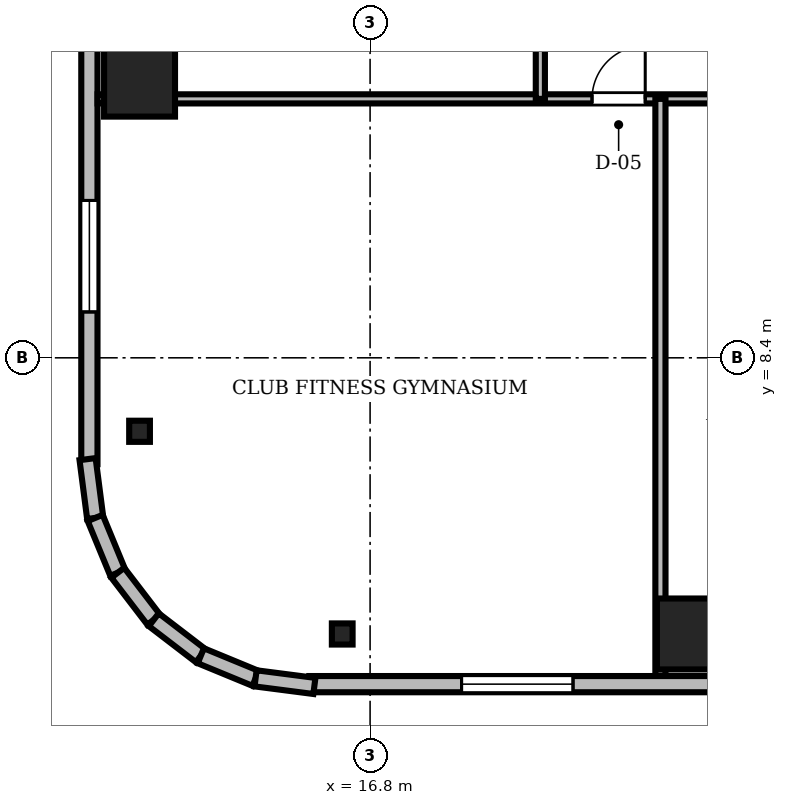
"""IFC4 building model, lengths in metres.
Left out: names, types, materials, properties, quantities, classifications, styles, units other than length and angle.
Written with IfcOpenShell. Run it as: python <this file> out.ifc"""

import sys

from ifc_helpers import new_model, si_unit, direction, frame, frame_2d, origin, origin_2d, place, context, subcontext, project, spatial, rectangle, i_section, extrude, source, transform, mapped, element, fill, save


model = new_model("IFC4")
c1 = context("Model", 3, precision=1e-05, world=origin(), true_north=direction((0.0, 1.0)))
c2 = subcontext(c1, "Body", "Model", "MODEL_VIEW")
j1 = project(units=[si_unit("LENGTHUNIT", "METRE"), si_unit("PLANEANGLEUNIT", "RADIAN")], contexts=[c1])
p1 = place(None, origin())
s1 = spatial("IfcSite", under=j1, at=p1, CompositionType="ELEMENT")
p2 = place(p1, origin())
s2 = spatial("IfcBuilding", under=s1, at=p2, CompositionType="ELEMENT")
p3 = place(p2, frame((0.0, 0.0, 184.8)))
s3 = spatial("IfcBuildingStorey", under=s2, at=p3, CompositionType="ELEMENT", Elevation=184.8)
m1 = source(origin(), c2, "Body", "SweptSolid", [
    extrude(rectangle(XDim=1.4, YDim=1.4, at=origin_2d()), origin(), (0.0, 0.0, 1.0), 3.53),
])
for number, where, z_axis, x_axis in (
    (1, (23.16, 2.95, 0.0), (0.0, 0.0, 1.0), (1.0, 0.0, 0.0)),
    (2, (12.25, 13.86, 0.0), (0.0, 0.0, 1.0), (1.0, 0.0, 0.0)),
):
    element("IfcColumn", number, at=place(p3, frame(where, z_axis=z_axis, x_axis=x_axis)), inside=s3, PredefinedType="COLUMN", context=c2, shape_type="MappedRepresentation", body=[
        mapped(m1, transform((0.0, 0.0, 0.0), scale=1.0)),
    ])
m2 = source(origin(), c2, "Body", "SweptSolid", [
    extrude(i_section(OverallWidth=0.409, OverallDepth=0.417, WebThickness=0.021, FlangeThickness=0.033, FilletRadius=0.015, at=origin_2d()), origin(), (0.0, 0.0, 1.0), 3.53),
])
for number, where, z_axis, x_axis in (
    (3, (16.25, 2.95, 0.0), (0.0, 0.0, 1.0), (1.0, 0.0, 0.0)),
    (4, (12.25, 6.95, 0.0), (0.0, 0.0, 1.0), (1.0, 0.0, 0.0)),
):
    element("IfcColumn", number, at=place(p3, frame(where, z_axis=z_axis, x_axis=x_axis)), inside=s3, PredefinedType="COLUMN", context=c2, shape_type="MappedRepresentation", body=[
        mapped(m2, transform((0.0, 0.0, 0.0), scale=1.0)),
    ])
m3 = source(origin(), c2, "Body", "SweptSolid", [
    extrude(rectangle(XDim=15.6, YDim=0.32, at=frame_2d((7.8, 0.0))), origin(), (0.0, 0.0, 1.0), 3.53),
])
p4 = place(p3, frame((15.6, 1.96, 0.0), z_axis=(0.0, 0.0, 1.0), x_axis=(1.0, 0.0, 0.0)))
e5 = element("IfcWall", 5, at=p4, inside=s3, PredefinedType="SOLIDWALL", context=c2, shape_type="MappedRepresentation", body=[
    mapped(m3, transform((0.0, 0.0, 0.0), scale=1.0)),
])
m4 = source(origin(), c2, "Body", "SweptSolid", [
    extrude(rectangle(XDim=1.4, YDim=2.3, at=frame_2d((0.7, 1.15))), frame((0.0, 0.17, 0.0), z_axis=(0.0, -1.0, 0.0), x_axis=(1.0, 0.0, 0.0)), (0.0, 0.0, 1.0), 0.34),
])
p5 = place(p4, frame((9.61, 0.0, 0.0)))
e6 = element("IfcOpeningElement", 6, at=p5, cuts=e5, PredefinedType="OPENING", context=c2, shape_type="MappedRepresentation", body=[
    mapped(m4, transform((0.0, 0.0, 0.0), scale=1.0)),
])
m5 = source(origin(), c2, "Body", "SweptSolid", [
    extrude(rectangle(XDim=2.2, YDim=2.4, at=frame_2d((1.1, 1.2))), frame((0.0, 0.17, 0.0), z_axis=(0.0, -1.0, 0.0), x_axis=(1.0, 0.0, 0.0)), (0.0, 0.0, 1.0), 0.34),
])
p6 = place(p4, frame((3.005, 0.0, 0.72)))
e7 = element("IfcOpeningElement", 7, at=p6, cuts=e5, PredefinedType="OPENING", context=c2, shape_type="MappedRepresentation", body=[
    mapped(m5, transform((0.0, 0.0, 0.0), scale=1.0)),
])
p7 = place(p3, frame((11.26, 21.9, 0.0), z_axis=(0.0, 0.0, 1.0), x_axis=(0.0, -1.0, 0.0)))
e8 = element("IfcWall", 8, at=p7, inside=s3, PredefinedType="SOLIDWALL", context=c2, shape_type="MappedRepresentation", body=[
    mapped(m3, transform((0.0, 0.0, 0.0), scale=1.0)),
])
p8 = place(p7, frame((10.395, 0.0, 0.72)))
e9 = element("IfcOpeningElement", 9, at=p8, cuts=e8, PredefinedType="OPENING", context=c2, shape_type="MappedRepresentation", body=[
    mapped(m5, transform((0.0, 0.0, 0.0), scale=1.0)),
])
m6 = source(origin(), c2, "Body", "SweptSolid", [
    extrude(rectangle(XDim=1.171, YDim=0.32, at=frame_2d((0.585, 0.0))), origin(), (0.0, 0.0, 1.0), 3.53),
])
p9 = place(p3, frame((11.224, 6.401, 0.0), z_axis=(0.0, 0.0, 1.0), x_axis=(0.128269133229, -0.991739395941, 0.0)))
e10 = element("IfcWall", 10, at=p9, inside=s3, PredefinedType="SOLIDWALL", context=c2, shape_type="MappedRepresentation", body=[
    mapped(m6, transform((0.0, 0.0, 0.0), scale=1.0)),
])
m7 = source(origin(), c2, "Body", "SweptSolid", [
    extrude(rectangle(XDim=1.169, YDim=0.32, at=frame_2d((0.584, 0.0))), origin(), (0.0, 0.0, 1.0), 3.53),
])
for number, where, z_axis, x_axis in (
    (11, (11.375, 5.24, 0.0), (0.0, 0.0, 1.0), (0.381, -0.925, 0.0)),
    (12, (11.82, 4.159, 0.0), (0.0, 0.0, 1.0), (0.608, -0.794, 0.0)),
):
    element("IfcWall", number, at=place(p3, frame(where, z_axis=z_axis, x_axis=x_axis)), inside=s3, PredefinedType="SOLIDWALL", context=c2, shape_type="MappedRepresentation", body=[
        mapped(m7, transform((0.0, 0.0, 0.0), scale=1.0)),
    ])
m8 = source(origin(), c2, "Body", "SweptSolid", [
    extrude(rectangle(XDim=1.169, YDim=0.32, at=frame_2d((0.584, 0.0))), origin(), (0.0, 0.0, 1.0), 3.53),
])
p10 = place(p3, frame((12.531, 3.231, 0.0), z_axis=(0.0, 0.0, 1.0), x_axis=(0.793663520347, -0.608356981114, 0.0)))
e13 = element("IfcWall", 13, at=p10, inside=s3, PredefinedType="SOLIDWALL", context=c2, shape_type="MappedRepresentation", body=[
    mapped(m8, transform((0.0, 0.0, 0.0), scale=1.0)),
])
m9 = source(origin(), c2, "Body", "SweptSolid", [
    extrude(rectangle(XDim=1.169, YDim=0.32, at=frame_2d((0.585, 0.0))), origin(), (0.0, 0.0, 1.0), 3.53),
])
p11 = place(p3, frame((13.459, 2.52, 0.0), z_axis=(0.0, 0.0, 1.0), x_axis=(0.924479075121, -0.381232789334, 0.0)))
e14 = element("IfcWall", 14, at=p11, inside=s3, PredefinedType="SOLIDWALL", context=c2, shape_type="MappedRepresentation", body=[
    mapped(m9, transform((0.0, 0.0, 0.0), scale=1.0)),
])
m10 = source(origin(), c2, "Body", "SweptSolid", [
    extrude(rectangle(XDim=1.17, YDim=0.32, at=frame_2d((0.585, 0.0))), origin(), (0.0, 0.0, 1.0), 3.53),
])
p12 = place(p3, frame((14.54, 2.074, 0.0), z_axis=(0.0, 0.0, 1.0), x_axis=(0.991762485493, -0.128090485085, 0.0)))
e15 = element("IfcWall", 15, at=p12, inside=s3, PredefinedType="SOLIDWALL", context=c2, shape_type="MappedRepresentation", body=[
    mapped(m10, transform((0.0, 0.0, 0.0), scale=1.0)),
])
m11 = source(origin(), c2, "Body", "SweptSolid", [
    extrude(rectangle(XDim=46.156, YDim=0.18, at=frame_2d((23.078, 0.0))), origin(), (0.0, 0.0, 1.0), 2.772),
])
p13 = place(p3, frame((11.422, 13.51, 0.0), z_axis=(0.0, 0.0, 1.0), x_axis=(1.0, 0.0, 0.0)))
e16 = element("IfcWall", 16, at=p13, inside=s3, PredefinedType="PARTITIONING", context=c2, shape_type="MappedRepresentation", body=[
    mapped(m11, transform((0.0, 0.0, 0.0), scale=1.0)),
])
m12 = source(origin(), c2, "Body", "SweptSolid", [
    extrude(rectangle(XDim=1.05, YDim=2.2, at=frame_2d((0.525, 1.1))), frame((0.0, 0.1, 0.0), z_axis=(0.0, -1.0, 0.0), x_axis=(1.0, 0.0, 0.0)), (0.0, 0.0, 1.0), 0.2),
])
p14 = place(p13, frame((9.758, 0.0, 0.0)))
e17 = element("IfcOpeningElement", 17, at=p14, cuts=e16, PredefinedType="OPENING", context=c2, shape_type="MappedRepresentation", body=[
    mapped(m12, transform((0.0, 0.0, 0.0), scale=1.0)),
])
p15 = place(p13, frame((12.878, 0.0, 0.0)))
e18 = element("IfcOpeningElement", 18, at=p15, cuts=e16, PredefinedType="OPENING", context=c2, shape_type="MappedRepresentation", body=[
    mapped(m12, transform((0.0, 0.0, 0.0), scale=1.0)),
])
p16 = place(p13, frame((16.893, 0.0, 0.0)))
e19 = element("IfcOpeningElement", 19, at=p16, cuts=e16, PredefinedType="OPENING", context=c2, shape_type="MappedRepresentation", body=[
    mapped(m12, transform((0.0, 0.0, 0.0), scale=1.0)),
])
p17 = place(p13, frame((20.344, 0.0, 0.0)))
e20 = element("IfcOpeningElement", 20, at=p17, cuts=e16, PredefinedType="OPENING", context=c2, shape_type="MappedRepresentation", body=[
    mapped(m12, transform((0.0, 0.0, 0.0), scale=1.0)),
])
p18 = place(p13, frame((24.008, 0.0, 0.0)))
e21 = element("IfcOpeningElement", 21, at=p18, cuts=e16, PredefinedType="OPENING", context=c2, shape_type="MappedRepresentation", body=[
    mapped(m12, transform((0.0, 0.0, 0.0), scale=1.0)),
])
p19 = place(p13, frame((28.055, 0.0, 0.0)))
e22 = element("IfcOpeningElement", 22, at=p19, cuts=e16, PredefinedType="OPENING", context=c2, shape_type="MappedRepresentation", body=[
    mapped(m12, transform((0.0, 0.0, 0.0), scale=1.0)),
])
m13 = source(origin(), c2, "Body", "SweptSolid", [
    extrude(rectangle(XDim=0.95, YDim=2.15, at=frame_2d((0.475, 1.075))), frame((0.0, 0.1, 0.0), z_axis=(0.0, -1.0, 0.0), x_axis=(1.0, 0.0, 0.0)), (0.0, 0.0, 1.0), 0.2),
])
p20 = place(p13, frame((34.246, 0.0, 0.0)))
e23 = element("IfcOpeningElement", 23, at=p20, cuts=e16, PredefinedType="OPENING", context=c2, shape_type="MappedRepresentation", body=[
    mapped(m13, transform((0.0, 0.0, 0.0), scale=1.0)),
])
p21 = place(p13, frame((37.498, 0.0, 0.0)))
e24 = element("IfcOpeningElement", 24, at=p21, cuts=e16, PredefinedType="OPENING", context=c2, shape_type="MappedRepresentation", body=[
    mapped(m12, transform((0.0, 0.0, 0.0), scale=1.0)),
])
m14 = source(origin(), c2, "Body", "SweptSolid", [
    extrude(rectangle(XDim=15.04, YDim=0.18, at=frame_2d((7.52, 0.0))), origin(), (0.0, 0.0, 1.0), 2.972),
])
p22 = place(p3, frame((20.16, 13.51, 0.0), z_axis=(0.0, 0.0, 1.0), x_axis=(0.0, 1.0, 0.0)))
e25 = element("IfcWall", 25, at=p22, inside=s3, PredefinedType="PARTITIONING", context=c2, shape_type="MappedRepresentation", body=[
    mapped(m14, transform((0.0, 0.0, 0.0), scale=1.0)),
])
p23 = place(p22, frame((3.202, 0.0, 0.0)))
e26 = element("IfcOpeningElement", 26, at=p23, cuts=e25, PredefinedType="OPENING", context=c2, shape_type="MappedRepresentation", body=[
    mapped(m12, transform((0.0, 0.0, 0.0), scale=1.0)),
])
p24 = place(p22, frame((11.873, 0.0, 0.0)))
e27 = element("IfcOpeningElement", 27, at=p24, cuts=e25, PredefinedType="OPENING", context=c2, shape_type="MappedRepresentation", body=[
    mapped(m13, transform((0.0, 0.0, 0.0), scale=1.0)),
])
m15 = source(origin(), c2, "Body", "SweptSolid", [
    extrude(rectangle(XDim=11.388, YDim=0.2, at=frame_2d((5.694, 0.0))), origin(), (0.0, 0.0, 1.0), 2.772),
])
p25 = place(p3, frame((22.53, 2.122, 0.0), z_axis=(0.0, 0.0, 1.0), x_axis=(0.0, 1.0, 0.0)))
e28 = element("IfcWall", 28, at=p25, inside=s3, PredefinedType="PARTITIONING", context=c2, shape_type="MappedRepresentation", body=[
    mapped(m15, transform((0.0, 0.0, 0.0), scale=1.0)),
])
m16 = source(origin(), c2, "Body", "SweptSolid", [
    extrude(rectangle(XDim=2.2, YDim=2.4, at=frame_2d((1.1, 1.2))), frame((0.0, 0.03, 0.0), z_axis=(0.0, -1.0, 0.0), x_axis=(1.0, 0.0, 0.0)), (0.0, 0.0, 1.0), 0.06),
])
p26 = place(p6, origin())
e29 = element("IfcWindow", 29, at=p26, inside=s3, PartitioningType="SINGLE_PANEL", PredefinedType="WINDOW", context=c2, shape_type="MappedRepresentation", body=[
    mapped(m16, transform((0.0, 0.0, 0.0), scale=1.0)),
])
fill(e7, e29)
p27 = place(p8, origin())
e30 = element("IfcWindow", 30, at=p27, inside=s3, PartitioningType="SINGLE_PANEL", PredefinedType="WINDOW", context=c2, shape_type="MappedRepresentation", body=[
    mapped(m16, transform((0.0, 0.0, 0.0), scale=1.0)),
])
fill(e9, e30)
m17 = source(origin(), c2, "Body", "SweptSolid", [
    extrude(rectangle(XDim=1.05, YDim=2.2, at=frame_2d((0.525, 1.1))), frame((0.0, 0.025, 0.0), z_axis=(0.0, -1.0, 0.0), x_axis=(1.0, 0.0, 0.0)), (0.0, 0.0, 1.0), 0.05),
])
p28 = place(p14, origin())
e31 = element("IfcDoor", 31, at=p28, inside=s3, OperationType="SINGLE_SWING_RIGHT", PredefinedType="DOOR", context=c2, shape_type="MappedRepresentation", body=[
    mapped(m17, transform((0.0, 0.0, 0.0), scale=1.0)),
])
fill(e17, e31)
save(model, sys.argv[1])
